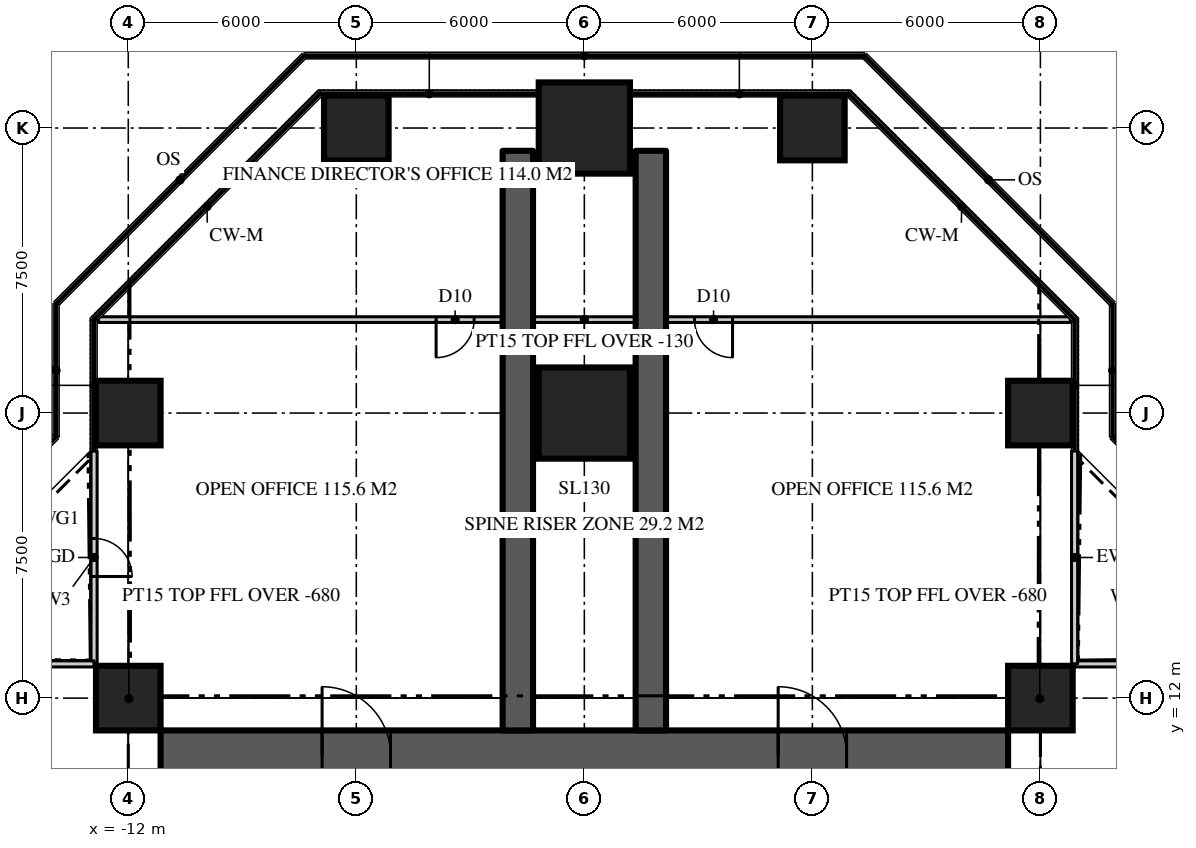
"""IFC4 building model, lengths in metres.
Left out: names, types, materials, properties, quantities, classifications, styles, units other than length and angle.
Written with IfcOpenShell. Run it as: python <this file> out.ifc"""

import sys

from ifc_helpers import new_model, si_unit, direction, frame, frame_2d, origin, origin_2d, place, context, subcontext, project, spatial, rectangle, extrude, element, fill, save


model = new_model("IFC4")
c1 = context("Model", 3, precision=1e-05, world=origin(), true_north=direction((0.0, 1.0)))
c2 = subcontext(c1, "Body", "Model", "MODEL_VIEW")
j1 = project(units=[si_unit("LENGTHUNIT", "METRE"), si_unit("PLANEANGLEUNIT", "RADIAN")], contexts=[c1])
p1 = place(None, origin())
s1 = spatial("IfcSite", under=j1, at=p1, CompositionType="ELEMENT")
p2 = place(p1, origin())
s2 = spatial("IfcBuilding", under=s1, at=p2, CompositionType="ELEMENT")
p3 = place(p2, frame((0.0, 0.0, 132.0)))
s3 = spatial("IfcBuildingStorey", under=s2, at=p3, CompositionType="ELEMENT", Elevation=132.0)
p4 = place(p3, frame((-11.15, 10.5, 0.0), z_axis=(0.0, 0.0, 1.0), x_axis=(1.0, 0.0, 0.0)))
e1 = element("IfcWall", 1, at=p4, inside=s3, PredefinedType="SHEAR", context=c2, shape_type="SweptSolid", body=[
    extrude(rectangle(XDim=22.3, YDim=1.3, at=frame_2d((11.15, 0.0))), origin(), (0.0, 0.0, 1.0), 3.9),
])
p5 = place(p4, frame((4.25, 0.0, 0.0)))
e2 = element("IfcOpeningElement", 2, at=p5, cuts=e1, PredefinedType="OPENING", context=c2, shape_type="SweptSolid", body=[
    extrude(rectangle(XDim=1.8, YDim=2.2, at=frame_2d((0.9, 1.1))), frame((0.0, 0.66, 0.0), z_axis=(0.0, -1.0, 0.0), x_axis=(1.0, 0.0, 0.0)), (0.0, 0.0, 1.0), 1.32),
])
p6 = place(p4, frame((16.25, 0.0, 0.0)))
e3 = element("IfcOpeningElement", 3, at=p6, cuts=e1, PredefinedType="OPENING", context=c2, shape_type="SweptSolid", body=[
    extrude(rectangle(XDim=1.8, YDim=2.2, at=frame_2d((0.9, 1.1))), frame((0.0, 0.66, 0.0), z_axis=(0.0, -1.0, 0.0), x_axis=(1.0, 0.0, 0.0)), (0.0, 0.0, 1.0), 1.32),
])
for number, where, z_axis, x_axis in (
    (4, (1.75, 11.15, 0.0), (0.0, 0.0, 1.0), (0.0, 1.0, 0.0)),
    (5, (-1.75, 11.15, 0.0), (0.0, 0.0, 1.0), (0.0, 1.0, 0.0)),
):
    element("IfcWall", number, at=place(p3, frame(where, z_axis=z_axis, x_axis=x_axis)), inside=s3, PredefinedType="SHEAR", context=c2, shape_type="SweptSolid", body=[
        extrude(rectangle(XDim=15.25, YDim=0.8, at=frame_2d((7.625, 0.0))), origin(), (0.0, 0.0, 1.0), 3.9),
    ])
for number, where, z_axis, x_axis in (
    (6, (-12.0, 12.0, 0.0), (0.0, 0.0, 1.0), (1.0, 0.0, 0.0)),
    (7, (12.0, 12.0, 0.0), (0.0, 0.0, 1.0), (1.0, 0.0, 0.0)),
    (8, (-12.0, 19.5, 0.0), (0.0, 0.0, 1.0), (1.0, 0.0, 0.0)),
):
    element("IfcColumn", number, at=place(p3, frame(where, z_axis=z_axis, x_axis=x_axis)), inside=s3, PredefinedType="COLUMN", context=c2, shape_type="SweptSolid", body=[
        extrude(rectangle(XDim=1.7, YDim=1.7, at=origin_2d()), origin(), (0.0, 0.0, 1.0), 3.9),
    ])
p7 = place(p3, frame((0.0, 19.5, 0.0), z_axis=(0.0, 0.0, 1.0), x_axis=(1.0, 0.0, 0.0)))
e9 = element("IfcColumn", 9, at=p7, inside=s3, PredefinedType="COLUMN", context=c2, shape_type="SweptSolid", body=[
    extrude(rectangle(XDim=2.4, YDim=2.4, at=origin_2d()), origin(), (0.0, 0.0, 1.0), 3.9),
])
for number, where, z_axis, x_axis in (
    (10, (12.0, 19.5, 0.0), (0.0, 0.0, 1.0), (1.0, 0.0, 0.0)),
    (11, (-6.0, 27.0, 0.0), (0.0, 0.0, 1.0), (1.0, 0.0, 0.0)),
):
    element("IfcColumn", number, at=place(p3, frame(where, z_axis=z_axis, x_axis=x_axis)), inside=s3, PredefinedType="COLUMN", context=c2, shape_type="SweptSolid", body=[
        extrude(rectangle(XDim=1.7, YDim=1.7, at=origin_2d()), origin(), (0.0, 0.0, 1.0), 3.9),
    ])
p8 = place(p3, frame((0.0, 27.0, 0.0), z_axis=(0.0, 0.0, 1.0), x_axis=(1.0, 0.0, 0.0)))
e12 = element("IfcColumn", 12, at=p8, inside=s3, PredefinedType="COLUMN", context=c2, shape_type="SweptSolid", body=[
    extrude(rectangle(XDim=2.4, YDim=2.4, at=origin_2d()), origin(), (0.0, 0.0, 1.0), 3.9),
])
p9 = place(p3, frame((6.0, 27.0, 0.0), z_axis=(0.0, 0.0, 1.0), x_axis=(1.0, 0.0, 0.0)))
e13 = element("IfcColumn", 13, at=p9, inside=s3, PredefinedType="COLUMN", context=c2, shape_type="SweptSolid", body=[
    extrude(rectangle(XDim=1.7, YDim=1.7, at=origin_2d()), origin(), (0.0, 0.0, 1.0), 3.9),
])
p10 = place(p3, frame((18.5, 12.9, 0.0), z_axis=(0.0, 0.0, 1.0), x_axis=(-1.0, 0.0, 0.0)))
e14 = element("IfcWall", 14, at=p10, inside=s3, PredefinedType="SOLIDWALL", context=c2, shape_type="SweptSolid", body=[
    extrude(rectangle(XDim=5.6, YDim=0.16, at=frame_2d((2.8, 0.0))), origin(), (0.0, 0.0, 1.0), 3.77),
])
p11 = place(p10, frame((2.3, 0.0, 0.0)))
e15 = element("IfcOpeningElement", 15, at=p11, cuts=e14, PredefinedType="OPENING", context=c2, shape_type="SweptSolid", body=[
    extrude(rectangle(XDim=1.0, YDim=2.2, at=frame_2d((0.5, 1.1))), frame((0.0, 0.09, 0.0), z_axis=(0.0, -1.0, 0.0), x_axis=(1.0, 0.0, 0.0)), (0.0, 0.0, 1.0), 0.18),
])
p12 = place(p3, frame((12.9, 12.9, 0.0), z_axis=(0.0, 0.0, 1.0), x_axis=(0.0, 1.0, 0.0)))
e16 = element("IfcWall", 16, at=p12, inside=s3, PredefinedType="SOLIDWALL", context=c2, shape_type="SweptSolid", body=[
    extrude(rectangle(XDim=5.6, YDim=0.16, at=frame_2d((2.8, 0.0))), origin(), (0.0, 0.0, 1.0), 3.77),
])
p13 = place(p3, frame((-12.9, 18.5, 0.0), z_axis=(0.0, 0.0, 1.0), x_axis=(0.0, -1.0, 0.0)))
e17 = element("IfcWall", 17, at=p13, inside=s3, PredefinedType="SOLIDWALL", context=c2, shape_type="SweptSolid", body=[
    extrude(rectangle(XDim=5.6, YDim=0.16, at=frame_2d((2.8, 0.0))), origin(), (0.0, 0.0, 1.0), 3.77),
])
p14 = place(p13, frame((2.3, 0.0, 0.0)))
e18 = element("IfcOpeningElement", 18, at=p14, cuts=e17, PredefinedType="OPENING", context=c2, shape_type="SweptSolid", body=[
    extrude(rectangle(XDim=1.0, YDim=2.2, at=frame_2d((0.5, 1.1))), frame((0.0, 0.09, 0.0), z_axis=(0.0, -1.0, 0.0), x_axis=(1.0, 0.0, 0.0)), (0.0, 0.0, 1.0), 0.18),
])
p15 = place(p3, frame((-12.9, 12.9, 0.0), z_axis=(0.0, 0.0, 1.0), x_axis=(-1.0, 0.0, 0.0)))
e19 = element("IfcWall", 19, at=p15, inside=s3, PredefinedType="SOLIDWALL", context=c2, shape_type="SweptSolid", body=[
    extrude(rectangle(XDim=5.6, YDim=0.16, at=frame_2d((2.8, 0.0))), origin(), (0.0, 0.0, 1.0), 3.77),
])
p16 = place(p3, frame((12.786, 21.959, 0.0), z_axis=(0.0, 0.0, 1.0), x_axis=(-1.0, 0.0, 0.0)))
e20 = element("IfcWall", 20, at=p16, inside=s3, PredefinedType="PARTITIONING", context=c2, shape_type="SweptSolid", body=[
    extrude(rectangle(XDim=25.573, YDim=0.15, at=frame_2d((12.786, 0.0))), origin(), (0.0, 0.0, 1.0), 3.77),
])
p17 = place(p16, frame((15.687, 0.0, 0.0)))
e21 = element("IfcOpeningElement", 21, at=p17, cuts=e20, PredefinedType="OPENING", context=c2, shape_type="SweptSolid", body=[
    extrude(rectangle(XDim=1.0, YDim=2.2, at=frame_2d((0.5, 1.1))), frame((0.0, 0.085, 0.0), z_axis=(0.0, -1.0, 0.0), x_axis=(1.0, 0.0, 0.0)), (0.0, 0.0, 1.0), 0.17),
])
p18 = place(p16, frame((8.886, 0.0, 0.0)))
e22 = element("IfcOpeningElement", 22, at=p18, cuts=e20, PredefinedType="OPENING", context=c2, shape_type="SweptSolid", body=[
    extrude(rectangle(XDim=1.0, YDim=2.2, at=frame_2d((0.5, 1.1))), frame((0.0, 0.085, 0.0), z_axis=(0.0, -1.0, 0.0), x_axis=(1.0, 0.0, 0.0)), (0.0, 0.0, 1.0), 0.17),
])
for number, where, z_axis, x_axis in (
    (23, (11.15, 11.15, 0.0), (0.0, 0.0, 1.0), (0.707, 0.707, 0.0)),
    (24, (-11.15, 11.15, 0.0), (0.0, 0.0, 1.0), (-0.707, 0.707, 0.0)),
):
    element("IfcWall", number, at=place(p3, frame(where, z_axis=z_axis, x_axis=x_axis)), inside=s3, PredefinedType="PARTITIONING", context=c2, shape_type="SweptSolid", body=[
        extrude(rectangle(XDim=2.362, YDim=0.15, at=frame_2d((1.181, 0.0))), origin(), (0.0, 0.0, 1.0), 3.22),
    ])
p19 = place(p14, origin())
e25 = element("IfcDoor", 25, at=p19, inside=s3, OperationType="SINGLE_SWING_RIGHT", PredefinedType="DOOR", context=c2, shape_type="SweptSolid", body=[
    extrude(rectangle(XDim=1.0, YDim=2.2, at=frame_2d((0.5, 1.1))), frame((0.0, 0.025, 0.0), z_axis=(0.0, -1.0, 0.0), x_axis=(1.0, 0.0, 0.0)), (0.0, 0.0, 1.0), 0.05),
])
fill(e18, e25)
p20 = place(p5, origin())
e26 = element("IfcDoor", 26, at=p20, inside=s3, OperationType="DOUBLE_DOOR_DOUBLE_SWING", PredefinedType="DOOR", context=c2, shape_type="SweptSolid", body=[
    extrude(rectangle(XDim=1.8, YDim=2.2, at=frame_2d((0.9, 1.1))), frame((0.0, 0.025, 0.0), z_axis=(0.0, -1.0, 0.0), x_axis=(1.0, 0.0, 0.0)), (0.0, 0.0, 1.0), 0.05),
])
fill(e2, e26)
p21 = place(p6, origin())
e27 = element("IfcDoor", 27, at=p21, inside=s3, OperationType="DOUBLE_DOOR_DOUBLE_SWING", PredefinedType="DOOR", context=c2, shape_type="SweptSolid", body=[
    extrude(rectangle(XDim=1.8, YDim=2.2, at=frame_2d((0.9, 1.1))), frame((0.0, 0.025, 0.0), z_axis=(0.0, -1.0, 0.0), x_axis=(1.0, 0.0, 0.0)), (0.0, 0.0, 1.0), 0.05),
])
fill(e3, e27)
p22 = place(p17, origin())
e28 = element("IfcDoor", 28, at=p22, inside=s3, OperationType="SINGLE_SWING_RIGHT", PredefinedType="DOOR", context=c2, shape_type="SweptSolid", body=[
    extrude(rectangle(XDim=1.0, YDim=2.2, at=frame_2d((0.5, 1.1))), frame((0.0, 0.025, 0.0), z_axis=(0.0, -1.0, 0.0), x_axis=(1.0, 0.0, 0.0)), (0.0, 0.0, 1.0), 0.05),
])
fill(e21, e28)
p23 = place(p18, origin())
e29 = element("IfcDoor", 29, at=p23, inside=s3, OperationType="SINGLE_SWING_LEFT", PredefinedType="DOOR", context=c2, shape_type="SweptSolid", body=[
    extrude(rectangle(XDim=1.0, YDim=2.2, at=frame_2d((0.5, 1.1))), frame((0.0, 0.025, 0.0), z_axis=(0.0, -1.0, 0.0), x_axis=(1.0, 0.0, 0.0)), (0.0, 0.0, 1.0), 0.05),
])
fill(e22, e29)
save(model, sys.argv[1])
